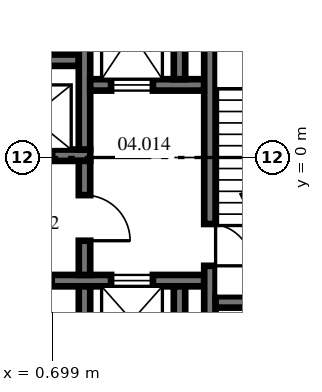
"""IFC4 building model, lengths in metres.
Left out: names, types, materials, properties, quantities, classifications, styles, units other than length and angle.
Written with IfcOpenShell. Run it as: python <this file> out.ifc"""

import sys

from ifc_helpers import new_model, si_unit, direction, frame, frame_2d, origin, place, context, subcontext, project, spatial, polyline, rectangle, outline, extrude, source, transform, mapped, element, fill, save


model = new_model("IFC4")
c1 = context("Model", 3, precision=1e-05, world=origin(), true_north=direction((0.0, 1.0)))
c2 = subcontext(c1, "Body", "Model", "MODEL_VIEW")
j1 = project(units=[si_unit("LENGTHUNIT", "METRE"), si_unit("PLANEANGLEUNIT", "RADIAN")], contexts=[c1])
p1 = place(None, origin())
s1 = spatial("IfcSite", under=j1, at=p1, CompositionType="ELEMENT")
p2 = place(p1, origin())
s2 = spatial("IfcBuilding", under=s1, at=p2, CompositionType="ELEMENT")
p3 = place(p2, frame((0.0, 0.0, 20.3)))
s3 = spatial("IfcBuildingStorey", under=s2, at=p3, CompositionType="ELEMENT", Elevation=20.3)
m1 = source(origin(), c2, "Body", "SweptSolid", [
    extrude(rectangle(XDim=11.5, YDim=0.3, at=frame_2d((5.75, 0.0))), origin(), (0.0, 0.0, 1.0), 4.1),
])
p4 = place(p3, frame((-9.8, 0.06, 0.0), z_axis=(0.0, 0.0, 1.0), x_axis=(1.0, 0.0, 0.0)))
e1 = element("IfcWall", 1, at=p4, inside=s3, PredefinedType="SHEAR", context=c2, shape_type="MappedRepresentation", body=[
    mapped(m1, transform((0.0, 0.0, 0.0), scale=1.0)),
])
p5 = place(p4, frame((1.0, 0.0, 0.0)))
e2 = element("IfcOpeningElement", 2, at=p5, cuts=e1, PredefinedType="OPENING", context=c2, shape_type="SweptSolid", body=[
    extrude(rectangle(XDim=1.1, YDim=2.1, at=frame_2d((0.55, 1.05))), frame((0.0, 0.16, 0.0), z_axis=(0.0, -1.0, 0.0), x_axis=(1.0, 0.0, 0.0)), (0.0, 0.0, 1.0), 0.32),
])
p6 = place(p4, frame((3.8, 0.0, 0.0)))
e3 = element("IfcOpeningElement", 3, at=p6, cuts=e1, PredefinedType="OPENING", context=c2, shape_type="SweptSolid", body=[
    extrude(rectangle(XDim=1.1, YDim=2.1, at=frame_2d((0.55, 1.05))), frame((0.0, 0.16, 0.0), z_axis=(0.0, -1.0, 0.0), x_axis=(1.0, 0.0, 0.0)), (0.0, 0.0, 1.0), 0.32),
])
p7 = place(p4, frame((6.6, 0.0, 0.0)))
e4 = element("IfcOpeningElement", 4, at=p7, cuts=e1, PredefinedType="OPENING", context=c2, shape_type="SweptSolid", body=[
    extrude(rectangle(XDim=1.1, YDim=2.1, at=frame_2d((0.55, 1.05))), frame((0.0, 0.16, 0.0), z_axis=(0.0, -1.0, 0.0), x_axis=(1.0, 0.0, 0.0)), (0.0, 0.0, 1.0), 0.32),
])
p8 = place(p4, frame((9.4, 0.0, 0.0)))
e5 = element("IfcOpeningElement", 5, at=p8, cuts=e1, PredefinedType="OPENING", context=c2, shape_type="SweptSolid", body=[
    extrude(rectangle(XDim=1.1, YDim=2.1, at=frame_2d((0.55, 1.05))), frame((0.0, 0.16, 0.0), z_axis=(0.0, -1.0, 0.0), x_axis=(1.0, 0.0, 0.0)), (0.0, 0.0, 1.0), 0.32),
])
m2 = source(origin(), c2, "Body", "SweptSolid", [
    extrude(outline(polyline([(11.2, -0.15), (-0.349, -0.15), (-0.176, 0.15), (11.2, 0.15), (11.2, -0.15)])), origin(), (0.0, 0.0, 1.0), 4.1),
])
p9 = place(p3, frame((-9.8, 2.56, 0.0), z_axis=(0.0, 0.0, 1.0), x_axis=(1.0, 0.0, 0.0)))
e6 = element("IfcWall", 6, at=p9, inside=s3, PredefinedType="SHEAR", context=c2, shape_type="MappedRepresentation", body=[
    mapped(m2, transform((0.0, 0.0, 0.0), scale=1.0)),
])
m3 = source(origin(), c2, "Body", "SweptSolid", [
    extrude(rectangle(XDim=4.45, YDim=0.3, at=frame_2d((2.225, 0.0))), origin(), (0.0, 0.0, 1.0), 4.1),
])
p10 = place(p3, frame((1.55, 0.21, 0.0), z_axis=(0.0, 0.0, 1.0), x_axis=(0.0, 1.0, 0.0)))
e7 = element("IfcWall", 7, at=p10, inside=s3, PredefinedType="SHEAR", context=c2, shape_type="MappedRepresentation", body=[
    mapped(m3, transform((0.0, 0.0, 0.0), scale=1.0)),
])
m4 = source(origin(), c2, "Body", "SweptSolid", [
    extrude(rectangle(XDim=3.0, YDim=0.3, at=frame_2d((1.5, 0.0))), origin(), (0.0, 0.0, 1.0), 4.1),
])
p11 = place(p3, frame((1.7, 1.91, 0.0), z_axis=(0.0, 0.0, 1.0), x_axis=(1.0, 0.0, 0.0)))
e8 = element("IfcWall", 8, at=p11, inside=s3, PredefinedType="SHEAR", context=c2, shape_type="MappedRepresentation", body=[
    mapped(m4, transform((0.0, 0.0, 0.0), scale=1.0)),
])
p12 = place(p11, frame((0.55, 0.0, 0.0)))
e9 = element("IfcOpeningElement", 9, at=p12, cuts=e8, PredefinedType="OPENING", context=c2, shape_type="SweptSolid", body=[
    extrude(rectangle(XDim=1.1, YDim=2.1, at=frame_2d((0.55, 1.05))), frame((0.0, 0.16, 0.0), z_axis=(0.0, -1.0, 0.0), x_axis=(1.0, 0.0, 0.0)), (0.0, 0.0, 1.0), 0.32),
])
m5 = source(origin(), c2, "Body", "SweptSolid", [
    extrude(rectangle(XDim=2.9, YDim=0.3, at=frame_2d((1.45, 0.0))), origin(), (0.0, 0.0, 1.0), 4.1),
])
p13 = place(p3, frame((4.05, 2.06, 0.0), z_axis=(0.0, 0.0, 1.0), x_axis=(0.0, 1.0, 0.0)))
e10 = element("IfcWall", 10, at=p13, inside=s3, PredefinedType="SHEAR", context=c2, shape_type="MappedRepresentation", body=[
    mapped(m5, transform((0.0, 0.0, 0.0), scale=1.0)),
])
m6 = source(origin(), c2, "Body", "SweptSolid", [
    extrude(rectangle(XDim=12.8, YDim=0.3, at=frame_2d((6.4, 0.0))), origin(), (0.0, 0.0, 1.0), 4.1),
])
p14 = place(p3, frame((-8.1, -3.24, 0.0), z_axis=(0.0, 0.0, 1.0), x_axis=(1.0, 0.0, 0.0)))
e11 = element("IfcWall", 11, at=p14, inside=s3, PredefinedType="SHEAR", context=c2, shape_type="MappedRepresentation", body=[
    mapped(m6, transform((0.0, 0.0, 0.0), scale=1.0)),
])
p15 = place(p14, frame((2.212, 0.0, 0.0)))
e12 = element("IfcOpeningElement", 12, at=p15, cuts=e11, PredefinedType="OPENING", context=c2, shape_type="SweptSolid", body=[
    extrude(rectangle(XDim=0.9, YDim=2.1, at=frame_2d((0.45, 1.05))), frame((0.0, 0.16, 0.0), z_axis=(0.0, -1.0, 0.0), x_axis=(1.0, 0.0, 0.0)), (0.0, 0.0, 1.0), 0.32),
])
p16 = place(p14, frame((5.65, 0.0, 0.0)))
e13 = element("IfcOpeningElement", 13, at=p16, cuts=e11, PredefinedType="OPENING", context=c2, shape_type="SweptSolid", body=[
    extrude(rectangle(XDim=0.9, YDim=2.1, at=frame_2d((0.45, 1.05))), frame((0.0, 0.16, 0.0), z_axis=(0.0, -1.0, 0.0), x_axis=(1.0, 0.0, 0.0)), (0.0, 0.0, 1.0), 0.32),
])
p17 = place(p14, frame((7.887, 0.0, 0.0)))
e14 = element("IfcOpeningElement", 14, at=p17, cuts=e11, PredefinedType="OPENING", context=c2, shape_type="SweptSolid", body=[
    extrude(rectangle(XDim=0.9, YDim=2.1, at=frame_2d((0.45, 1.05))), frame((0.0, 0.16, 0.0), z_axis=(0.0, -1.0, 0.0), x_axis=(1.0, 0.0, 0.0)), (0.0, 0.0, 1.0), 0.32),
])
p18 = place(p14, frame((10.35, 0.0, 0.0)))
e15 = element("IfcOpeningElement", 15, at=p18, cuts=e11, PredefinedType="OPENING", context=c2, shape_type="SweptSolid", body=[
    extrude(rectangle(XDim=1.1, YDim=2.1, at=frame_2d((0.55, 1.05))), frame((0.0, 0.16, 0.0), z_axis=(0.0, -1.0, 0.0), x_axis=(1.0, 0.0, 0.0)), (0.0, 0.0, 1.0), 0.32),
])
m7 = source(origin(), c2, "Body", "SweptSolid", [
    extrude(rectangle(XDim=2.2, YDim=0.3, at=frame_2d((1.1, 0.0))), origin(), (0.0, 0.0, 1.0), 4.1),
])
p19 = place(p3, frame((1.55, -5.59, 0.0), z_axis=(0.0, 0.0, 1.0), x_axis=(0.0, 1.0, 0.0)))
e16 = element("IfcWall", 16, at=p19, inside=s3, PredefinedType="SHEAR", context=c2, shape_type="MappedRepresentation", body=[
    mapped(m7, transform((0.0, 0.0, 0.0), scale=1.0)),
])
m8 = source(origin(), c2, "Body", "SweptSolid", [
    extrude(rectangle(XDim=2.5, YDim=0.3, at=frame_2d((1.25, 0.0))), origin(), (0.0, 0.0, 1.0), 4.1),
])
p20 = place(p3, frame((4.05, -5.89, 0.0), z_axis=(0.0, 0.0, 1.0), x_axis=(0.0, 1.0, 0.0)))
e17 = element("IfcWall", 17, at=p20, inside=s3, PredefinedType="SHEAR", context=c2, shape_type="MappedRepresentation", body=[
    mapped(m8, transform((0.0, 0.0, 0.0), scale=1.0)),
])
p21 = place(p3, frame((1.55, -3.09, 0.0), z_axis=(0.0, 0.0, 1.0), x_axis=(0.0, 1.0, 0.0)))
e18 = element("IfcWall", 18, at=p21, inside=s3, PredefinedType="SHEAR", context=c2, shape_type="MappedRepresentation", body=[
    mapped(m4, transform((0.0, 0.0, 0.0), scale=1.0)),
])
p22 = place(p21, frame((0.9, 0.0, 0.0)))
e19 = element("IfcOpeningElement", 19, at=p22, cuts=e18, PredefinedType="OPENING", context=c2, shape_type="SweptSolid", body=[
    extrude(rectangle(XDim=1.2, YDim=2.1, at=frame_2d((0.6, 1.05))), frame((0.0, 0.16, 0.0), z_axis=(0.0, -1.0, 0.0), x_axis=(1.0, 0.0, 0.0)), (0.0, 0.0, 1.0), 0.32),
])
m9 = source(origin(), c2, "Body", "SweptSolid", [
    extrude(outline(polyline([(-0.15, -0.15), (9.99, -0.15), (9.99, 0.15), (0.15, 0.15), (-0.15, -0.15)])), origin(), (0.0, 0.0, 1.0), 4.1),
])
p23 = place(p3, frame((4.85, -6.04, 0.0), z_axis=(0.0, 0.0, 1.0), x_axis=(0.0, 1.0, 0.0)))
e20 = element("IfcWall", 20, at=p23, inside=s3, PredefinedType="SHEAR", context=c2, shape_type="MappedRepresentation", body=[
    mapped(m9, transform((0.0, 0.0, 0.0), scale=1.0)),
])
p24 = place(p23, frame((3.19, 0.0, 0.0)))
e21 = element("IfcOpeningElement", 21, at=p24, cuts=e20, PredefinedType="OPENING", context=c2, shape_type="SweptSolid", body=[
    extrude(rectangle(XDim=1.1, YDim=2.1, at=frame_2d((0.55, 1.05))), frame((0.0, 0.16, 0.0), z_axis=(0.0, -1.0, 0.0), x_axis=(1.0, 0.0, 0.0)), (0.0, 0.0, 1.0), 0.32),
])
m10 = source(origin(), c2, "Body", "SweptSolid", [
    extrude(outline(polyline([(0.0, -0.15), (0.0, 0.15), (4.433, 0.15), (4.26, -0.15), (0.0, -0.15)])), origin(), (0.0, 0.0, 1.0), 4.1),
])
p25 = place(p3, frame((5.0, -3.8, 0.0), z_axis=(0.0, 0.0, 1.0), x_axis=(1.0, 0.0, 0.0)))
e22 = element("IfcWall", 22, at=p25, inside=s3, PredefinedType="SHEAR", context=c2, shape_type="MappedRepresentation", body=[
    mapped(m10, transform((0.0, 0.0, 0.0), scale=1.0)),
])
p26 = place(p25, frame((2.45, 0.0, 0.0)))
e23 = element("IfcOpeningElement", 23, at=p26, cuts=e22, PredefinedType="OPENING", context=c2, shape_type="SweptSolid", body=[
    extrude(rectangle(XDim=1.1, YDim=2.1, at=frame_2d((0.55, 1.05))), frame((0.0, 0.16, 0.0), z_axis=(0.0, -1.0, 0.0), x_axis=(1.0, 0.0, 0.0)), (0.0, 0.0, 1.0), 0.32),
])
p27 = place(p24, frame((1.1, 0.0, 0.0), z_axis=(0.0, 0.0, 1.0), x_axis=(-1.0, 0.0, 0.0)))
e24 = element("IfcDoor", 24, at=p27, inside=s3, OperationType="SINGLE_SWING_RIGHT", PredefinedType="DOOR", context=c2, shape_type="SweptSolid", body=[
    extrude(rectangle(XDim=1.1, YDim=2.1, at=frame_2d((0.55, 1.05))), frame((0.0, 0.025, 0.0), z_axis=(0.0, -1.0, 0.0), x_axis=(1.0, 0.0, 0.0)), (0.0, 0.0, 1.0), 0.05),
])
fill(e21, e24)
p28 = place(p22, frame((1.2, 0.0, 0.0), z_axis=(0.0, 0.0, 1.0), x_axis=(-1.0, 0.0, 0.0)))
e25 = element("IfcDoor", 25, at=p28, inside=s3, OperationType="SINGLE_SWING_RIGHT", PredefinedType="DOOR", context=c2, shape_type="SweptSolid", body=[
    extrude(rectangle(XDim=1.2, YDim=2.1, at=frame_2d((0.6, 1.05))), frame((0.0, 0.025, 0.0), z_axis=(0.0, -1.0, 0.0), x_axis=(1.0, 0.0, 0.0)), (0.0, 0.0, 1.0), 0.05),
])
fill(e19, e25)
p29 = place(p12, origin())
e26 = element("IfcDoor", 26, at=p29, inside=s3, OperationType="DOUBLE_DOOR_SLIDING", PredefinedType="DOOR", context=c2, shape_type="SweptSolid", body=[
    extrude(rectangle(XDim=1.1, YDim=2.1, at=frame_2d((0.55, 1.05))), frame((0.0, 0.025, 0.0), z_axis=(0.0, -1.0, 0.0), x_axis=(1.0, 0.0, 0.0)), (0.0, 0.0, 1.0), 0.05),
])
fill(e9, e26)
p30 = place(p18, origin())
e27 = element("IfcDoor", 27, at=p30, inside=s3, OperationType="DOUBLE_DOOR_SLIDING", PredefinedType="DOOR", context=c2, shape_type="SweptSolid", body=[
    extrude(rectangle(XDim=1.1, YDim=2.1, at=frame_2d((0.55, 1.05))), frame((0.0, 0.025, 0.0), z_axis=(0.0, -1.0, 0.0), x_axis=(1.0, 0.0, 0.0)), (0.0, 0.0, 1.0), 0.05),
])
fill(e15, e27)
save(model, sys.argv[1])
